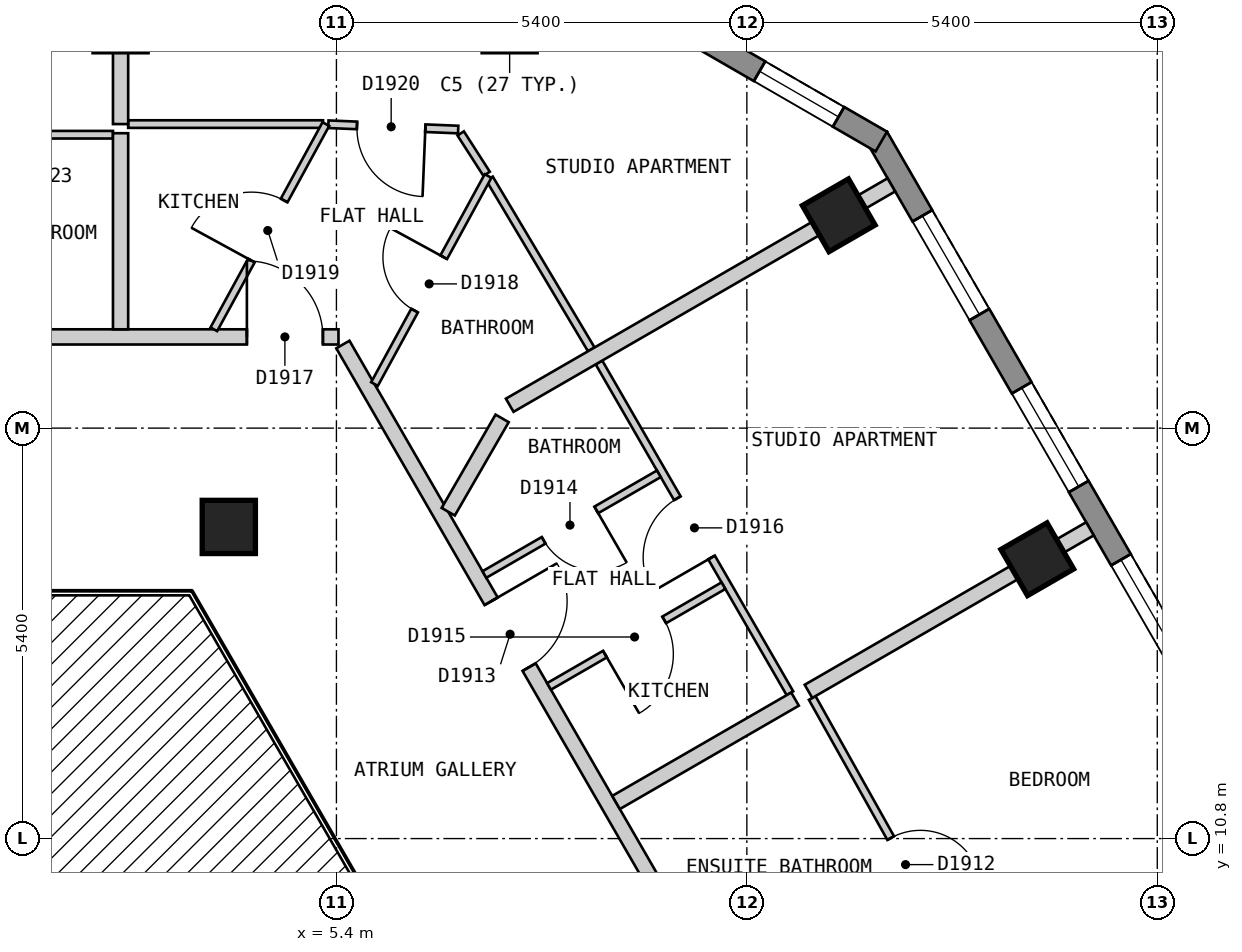
"""IFC4 building model, lengths in metres.
Left out: names, types, materials, properties, quantities, classifications, styles, units other than length and angle.
Written with IfcOpenShell. Run it as: python <this file> out.ifc"""

import sys

from ifc_helpers import new_model, si_unit, direction, frame, frame_2d, origin, origin_2d, place, context, subcontext, project, spatial, polyline, rectangle, outline, extrude, element, fill, save


model = new_model("IFC4")
c1 = context("Model", 3, precision=1e-05, world=origin(), true_north=direction((0.0, 1.0)))
c2 = subcontext(c1, "Body", "Model", "MODEL_VIEW")
j1 = project(units=[si_unit("LENGTHUNIT", "METRE"), si_unit("PLANEANGLEUNIT", "RADIAN")], contexts=[c1])
p1 = place(None, origin())
s1 = spatial("IfcSite", under=j1, at=p1, CompositionType="ELEMENT")
p2 = place(p1, origin())
s2 = spatial("IfcBuilding", under=s1, at=p2, CompositionType="ELEMENT")
p3 = place(p2, frame((0.0, 0.0, 226.8)))
s3 = spatial("IfcBuildingStorey", under=s2, at=p3, CompositionType="ELEMENT", Elevation=226.8)
for number, where, z_axis, x_axis in (
    (1, (14.621, 14.475, 0.0), (0.0, 0.0, 1.0), (-0.5, 0.866, 0.0)),
    (2, (12.009, 19.0, 0.0), (0.0, 0.0, 1.0), (-0.5, 0.866, 0.0)),
    (3, (3.984, 14.9, 0.0), (0.0, 0.0, 1.0), (1.0, 0.0, 0.0)),
):
    element("IfcColumn", number, at=place(p3, frame(where, z_axis=z_axis, x_axis=x_axis)), inside=s3, PredefinedType="COLUMN", context=c2, shape_type="SweptSolid", body=[
        extrude(rectangle(XDim=0.7, YDim=0.7, at=origin_2d()), origin(), (0.0, 0.0, 1.0), 3.0),
    ])
p4 = place(p3, frame((23.599, 0.825, 0.0), z_axis=(0.0, 0.0, 1.0), x_axis=(-0.500003656944, 0.866023292436, 0.0)))
e4 = element("IfcWall", 4, at=p4, inside=s3, PredefinedType="SOLIDWALL", context=c2, shape_type="SweptSolid", body=[
    extrude(outline(polyline([(0.0, -0.15), (22.17, -0.15), (22.09, 0.15), (0.08, 0.15), (0.0, -0.15)])), origin(), (0.0, 0.0, 1.0), 2.7),
])
p5 = place(p4, frame((1.191, 0.0, 0.15)))
e5 = element("IfcOpeningElement", 5, at=p5, cuts=e4, PredefinedType="OPENING", context=c2, shape_type="SweptSolid", body=[
    extrude(rectangle(XDim=1.5, YDim=2.1, at=frame_2d((0.75, 1.05))), frame((0.0, 0.16, 0.0), z_axis=(0.0, -1.0, 0.0), x_axis=(1.0, 0.0, 0.0)), (0.0, 0.0, 1.0), 0.32),
])
p6 = place(p4, frame((3.804, 0.0, 0.15)))
e6 = element("IfcOpeningElement", 6, at=p6, cuts=e4, PredefinedType="OPENING", context=c2, shape_type="SweptSolid", body=[
    extrude(rectangle(XDim=1.5, YDim=2.1, at=frame_2d((0.75, 1.05))), frame((0.0, 0.16, 0.0), z_axis=(0.0, -1.0, 0.0), x_axis=(1.0, 0.0, 0.0)), (0.0, 0.0, 1.0), 0.32),
])
p7 = place(p4, frame((6.417, 0.0, 0.15)))
e7 = element("IfcOpeningElement", 7, at=p7, cuts=e4, PredefinedType="OPENING", context=c2, shape_type="SweptSolid", body=[
    extrude(rectangle(XDim=1.5, YDim=2.1, at=frame_2d((0.75, 1.05))), frame((0.0, 0.16, 0.0), z_axis=(0.0, -1.0, 0.0), x_axis=(1.0, 0.0, 0.0)), (0.0, 0.0, 1.0), 0.32),
])
p8 = place(p4, frame((9.029, 0.0, 0.15)))
e8 = element("IfcOpeningElement", 8, at=p8, cuts=e4, PredefinedType="OPENING", context=c2, shape_type="SweptSolid", body=[
    extrude(rectangle(XDim=1.5, YDim=2.1, at=frame_2d((0.75, 1.05))), frame((0.0, 0.16, 0.0), z_axis=(0.0, -1.0, 0.0), x_axis=(1.0, 0.0, 0.0)), (0.0, 0.0, 1.0), 0.32),
])
p9 = place(p4, frame((11.641, 0.0, 0.15)))
e9 = element("IfcOpeningElement", 9, at=p9, cuts=e4, PredefinedType="OPENING", context=c2, shape_type="SweptSolid", body=[
    extrude(rectangle(XDim=1.5, YDim=2.1, at=frame_2d((0.75, 1.05))), frame((0.0, 0.16, 0.0), z_axis=(0.0, -1.0, 0.0), x_axis=(1.0, 0.0, 0.0)), (0.0, 0.0, 1.0), 0.32),
])
p10 = place(p4, frame((14.254, 0.0, 0.15)))
e10 = element("IfcOpeningElement", 10, at=p10, cuts=e4, PredefinedType="OPENING", context=c2, shape_type="SweptSolid", body=[
    extrude(rectangle(XDim=1.5, YDim=2.1, at=frame_2d((0.75, 1.05))), frame((0.0, 0.16, 0.0), z_axis=(0.0, -1.0, 0.0), x_axis=(1.0, 0.0, 0.0)), (0.0, 0.0, 1.0), 0.32),
])
p11 = place(p4, frame((16.866, 0.0, 0.15)))
e11 = element("IfcOpeningElement", 11, at=p11, cuts=e4, PredefinedType="OPENING", context=c2, shape_type="SweptSolid", body=[
    extrude(rectangle(XDim=1.5, YDim=2.1, at=frame_2d((0.75, 1.05))), frame((0.0, 0.16, 0.0), z_axis=(0.0, -1.0, 0.0), x_axis=(1.0, 0.0, 0.0)), (0.0, 0.0, 1.0), 0.32),
])
p12 = place(p4, frame((19.479, 0.0, 0.15)))
e12 = element("IfcOpeningElement", 12, at=p12, cuts=e4, PredefinedType="OPENING", context=c2, shape_type="SweptSolid", body=[
    extrude(rectangle(XDim=1.5, YDim=2.1, at=frame_2d((0.75, 1.05))), frame((0.0, 0.16, 0.0), z_axis=(0.0, -1.0, 0.0), x_axis=(1.0, 0.0, 0.0)), (0.0, 0.0, 1.0), 0.32),
])
p13 = place(p3, frame((12.569, 19.97, 0.0), z_axis=(0.0, 0.0, 1.0), x_axis=(-0.866022959057, 0.500004234368, 0.0)))
e13 = element("IfcWall", 13, at=p13, inside=s3, PredefinedType="SOLIDWALL", context=c2, shape_type="SweptSolid", body=[
    extrude(outline(polyline([(0.0, -0.15), (5.0, -0.15), (4.92, 0.15), (0.08, 0.15), (0.0, -0.15)])), origin(), (0.0, 0.0, 1.0), 2.7),
])
p14 = place(p13, frame((0.65, 0.0, 0.15)))
e14 = element("IfcOpeningElement", 14, at=p14, cuts=e13, PredefinedType="OPENING", context=c2, shape_type="SweptSolid", body=[
    extrude(rectangle(XDim=1.2, YDim=2.1, at=frame_2d((0.6, 1.05))), frame((0.0, 0.16, 0.0), z_axis=(0.0, -1.0, 0.0), x_axis=(1.0, 0.0, 0.0)), (0.0, 0.0, 1.0), 0.32),
])
p15 = place(p13, frame((3.15, 0.0, 0.15)))
e15 = element("IfcOpeningElement", 15, at=p15, cuts=e13, PredefinedType="OPENING", context=c2, shape_type="SweptSolid", body=[
    extrude(rectangle(XDim=1.2, YDim=2.1, at=frame_2d((0.6, 1.05))), frame((0.0, 0.16, 0.0), z_axis=(0.0, -1.0, 0.0), x_axis=(1.0, 0.0, 0.0)), (0.0, 0.0, 1.0), 0.32),
])
p16 = place(p3, frame((5.485, 17.3, 0.0), z_axis=(0.0, 0.0, 1.0), x_axis=(0.499943285704, -0.866058145322, 0.0)))
e16 = element("IfcWall", 16, at=p16, inside=s3, PredefinedType="PARTITIONING", context=c2, shape_type="SweptSolid", body=[
    extrude(rectangle(XDim=10.623, YDim=0.2, at=frame_2d((5.312, 0.0))), origin(), (0.0, 0.0, 1.0), 2.7),
])
p17 = place(p16, frame((3.901, 0.0, 0.0)))
e17 = element("IfcOpeningElement", 17, at=p17, cuts=e16, PredefinedType="OPENING", context=c2, shape_type="SweptSolid", body=[
    extrude(rectangle(XDim=1.0, YDim=2.1, at=frame_2d((0.5, 1.05))), frame((0.0, 0.11, 0.0), z_axis=(0.0, -1.0, 0.0), x_axis=(1.0, 0.0, 0.0)), (0.0, 0.0, 1.0), 0.22),
])
p18 = place(p3, frame((-5.312, 17.4, 0.0), z_axis=(0.0, 0.0, 1.0), x_axis=(1.0, 0.0, 0.0)))
e18 = element("IfcWall", 18, at=p18, inside=s3, PredefinedType="PARTITIONING", context=c2, shape_type="SweptSolid", body=[
    extrude(rectangle(XDim=10.739, YDim=0.2, at=frame_2d((5.37, 0.0))), origin(), (0.0, 0.0, 1.0), 2.7),
])
p19 = place(p18, frame((9.534, 0.0, 0.0)))
e19 = element("IfcOpeningElement", 19, at=p19, cuts=e18, PredefinedType="OPENING", context=c2, shape_type="SweptSolid", body=[
    extrude(rectangle(XDim=1.0, YDim=2.1, at=frame_2d((0.5, 1.05))), frame((0.0, 0.11, 0.0), z_axis=(0.0, -1.0, 0.0), x_axis=(1.0, 0.0, 0.0)), (0.0, 0.0, 1.0), 0.22),
])
p20 = place(p18, frame((4.812, 0.0, 0.0)))
e20 = element("IfcOpeningElement", 20, at=p20, cuts=e18, PredefinedType="OPENING", context=c2, shape_type="SweptSolid", body=[
    extrude(rectangle(XDim=1.0, YDim=2.1, at=frame_2d((0.5, 1.05))), frame((0.0, 0.11, 0.0), z_axis=(0.0, -1.0, 0.0), x_axis=(1.0, 0.0, 0.0)), (0.0, 0.0, 1.0), 0.22),
])
p21 = place(p18, frame((0.208, 0.0, 0.0)))
e21 = element("IfcOpeningElement", 21, at=p21, cuts=e18, PredefinedType="OPENING", context=c2, shape_type="SweptSolid", body=[
    extrude(rectangle(XDim=0.8, YDim=2.1, at=frame_2d((0.4, 1.05))), frame((0.0, 0.11, 0.0), z_axis=(0.0, -1.0, 0.0), x_axis=(1.0, 0.0, 0.0)), (0.0, 0.0, 1.0), 0.22),
])
p22 = place(p3, frame((7.035, 20.077, 0.0), z_axis=(0.0, 0.0, 1.0), x_axis=(0.540425167977, -0.841392083286, 0.0)))
e22 = element("IfcWall", 22, at=p22, inside=s3, PredefinedType="PARTITIONING", context=c2, shape_type="SweptSolid", body=[
    extrude(rectangle(XDim=0.631, YDim=0.1, at=frame_2d((0.315, 0.0))), origin(), (0.0, 0.0, 1.0), 2.7),
])
p23 = place(p3, frame((7.414, 19.484, 0.0), z_axis=(0.0, 0.0, 1.0), x_axis=(0.511734837015, -0.859143443544, 0.0)))
e23 = element("IfcWall", 23, at=p23, inside=s3, PredefinedType="PARTITIONING", context=c2, shape_type="SweptSolid", body=[
    extrude(rectangle(XDim=2.616, YDim=0.1, at=frame_2d((1.308, 0.0))), origin(), (0.0, 0.0, 1.0), 2.7),
])
p24 = place(p3, frame((8.854, 17.064, 0.0), z_axis=(0.0, 0.0, 1.0), x_axis=(0.500042049778, -0.866001124973, 0.0)))
e24 = element("IfcWall", 24, at=p24, inside=s3, PredefinedType="PARTITIONING", context=c2, shape_type="SweptSolid", body=[
    extrude(rectangle(XDim=5.025, YDim=0.1, at=frame_2d((2.513, 0.0))), origin(), (0.0, 0.0, 1.0), 2.7),
])
p25 = place(p24, frame((2.063, 0.0, 0.0)))
e25 = element("IfcOpeningElement", 25, at=p25, cuts=e24, PredefinedType="OPENING", context=c2, shape_type="SweptSolid", body=[
    extrude(rectangle(XDim=0.9, YDim=2.1, at=frame_2d((0.45, 1.05))), frame((0.0, 0.06, 0.0), z_axis=(0.0, -1.0, 0.0), x_axis=(1.0, 0.0, 0.0)), (0.0, 0.0, 1.0), 0.12),
])
p26 = place(p3, frame((11.66, 12.65, 0.0), z_axis=(0.0, 0.0, 1.0), x_axis=(0.488650242737, -0.872479764965, 0.0)))
e26 = element("IfcWall", 26, at=p26, inside=s3, PredefinedType="PARTITIONING", context=c2, shape_type="SweptSolid", body=[
    extrude(rectangle(XDim=5.075, YDim=0.1, at=frame_2d((2.538, 0.0))), origin(), (0.0, 0.0, 1.0), 2.7),
])
p27 = place(p26, frame((2.113, 0.0, 0.0)))
e27 = element("IfcOpeningElement", 27, at=p27, cuts=e26, PredefinedType="OPENING", context=c2, shape_type="SweptSolid", body=[
    extrude(rectangle(XDim=0.8, YDim=2.1, at=frame_2d((0.4, 1.05))), frame((0.0, 0.06, 0.0), z_axis=(0.0, -1.0, 0.0), x_axis=(1.0, 0.0, 0.0)), (0.0, 0.0, 1.0), 0.12),
])
p28 = place(p3, frame((5.294, 20.198, 0.0), z_axis=(0.0, 0.0, 1.0), x_axis=(0.999159599203, -0.040988965834, 0.0)))
e28 = element("IfcWall", 28, at=p28, inside=s3, PredefinedType="PARTITIONING", context=c2, shape_type="SweptSolid", body=[
    extrude(rectangle(XDim=1.709, YDim=0.1, at=frame_2d((0.855, 0.0))), origin(), (0.0, 0.0, 1.0), 2.7),
])
p29 = place(p28, frame((0.377, 0.0, 0.0)))
e29 = element("IfcOpeningElement", 29, at=p29, cuts=e28, PredefinedType="OPENING", context=c2, shape_type="SweptSolid", body=[
    extrude(rectangle(XDim=0.9, YDim=2.1, at=frame_2d((0.45, 1.05))), frame((0.0, 0.06, 0.0), z_axis=(0.0, -1.0, 0.0), x_axis=(1.0, 0.0, 0.0)), (0.0, 0.0, 1.0), 0.12),
])
p30 = place(p3, frame((-0.716, 20.06, 0.0), z_axis=(0.0, 0.0, 1.0), x_axis=(1.0, 0.0, 0.0)))
e30 = element("IfcWall", 30, at=p30, inside=s3, PredefinedType="PARTITIONING", context=c2, shape_type="SweptSolid", body=[
    extrude(rectangle(XDim=3.176, YDim=0.1, at=frame_2d((1.588, 0.0))), origin(), (0.0, 0.0, 1.0), 2.7),
])
p31 = place(p3, frame((2.66, 20.2, 0.0), z_axis=(0.0, 0.0, 1.0), x_axis=(1.0, 0.0, 0.0)))
e31 = element("IfcWall", 31, at=p31, inside=s3, PredefinedType="PARTITIONING", context=c2, shape_type="SweptSolid", body=[
    extrude(rectangle(XDim=2.564, YDim=0.1, at=frame_2d((1.282, 0.0))), origin(), (0.0, 0.0, 1.0), 2.7),
])
p32 = place(p3, frame((3.787, 17.5, 0.0), z_axis=(0.0, 0.0, 1.0), x_axis=(0.479146828267, 0.877734764585, 0.0)))
e32 = element("IfcWall", 32, at=p32, inside=s3, PredefinedType="PARTITIONING", context=c2, shape_type="SweptSolid", body=[
    extrude(rectangle(XDim=3.076, YDim=0.1, at=frame_2d((1.538, 0.0))), origin(), (0.0, 0.0, 1.0), 2.7),
])
p33 = place(p32, frame((1.031, 0.0, 0.0)))
e33 = element("IfcOpeningElement", 33, at=p33, cuts=e32, PredefinedType="OPENING", context=c2, shape_type="SweptSolid", body=[
    extrude(rectangle(XDim=0.9, YDim=2.1, at=frame_2d((0.45, 1.05))), frame((0.0, 0.06, 0.0), z_axis=(0.0, -1.0, 0.0), x_axis=(1.0, 0.0, 0.0)), (0.0, 0.0, 1.0), 0.12),
])
p34 = place(p3, frame((5.901, 16.78, 0.0), z_axis=(0.0, 0.0, 1.0), x_axis=(0.479148317257, 0.877733951759, 0.0)))
e34 = element("IfcWall", 34, at=p34, inside=s3, PredefinedType="PARTITIONING", context=c2, shape_type="SweptSolid", body=[
    extrude(rectangle(XDim=3.118, YDim=0.1, at=frame_2d((1.559, 0.0))), origin(), (0.0, 0.0, 1.0), 2.7),
])
p35 = place(p34, frame((1.101, 0.0, 0.0)))
e35 = element("IfcOpeningElement", 35, at=p35, cuts=e34, PredefinedType="OPENING", context=c2, shape_type="SweptSolid", body=[
    extrude(rectangle(XDim=0.8, YDim=2.1, at=frame_2d((0.4, 1.05))), frame((0.0, 0.06, 0.0), z_axis=(0.0, -1.0, 0.0), x_axis=(1.0, 0.0, 0.0)), (0.0, 0.0, 1.0), 0.12),
])
p36 = place(p3, frame((9.354, 5.401, 0.0), z_axis=(0.0, 0.0, 1.0), x_axis=(0.866018411306, 0.500012111133, 0.0)))
e36 = element("IfcWall", 36, at=p36, inside=s3, PredefinedType="PARTITIONING", context=c2, shape_type="SweptSolid", body=[
    extrude(rectangle(XDim=9.898, YDim=0.1, at=frame_2d((4.949, 0.0))), origin(), (0.0, 0.0, 1.0), 2.7),
])
p37 = place(p36, frame((7.277, 0.0, 0.0)))
e37 = element("IfcOpeningElement", 37, at=p37, cuts=e36, PredefinedType="OPENING", context=c2, shape_type="SweptSolid", body=[
    extrude(rectangle(XDim=0.9, YDim=2.1, at=frame_2d((0.45, 1.05))), frame((0.0, 0.06, 0.0), z_axis=(0.0, -1.0, 0.0), x_axis=(1.0, 0.0, 0.0)), (0.0, 0.0, 1.0), 0.12),
])
p38 = place(p3, frame((8.197, 12.802, 0.0), z_axis=(0.0, 0.0, 1.0), x_axis=(0.866029095148, 0.499993606316, 0.0)))
e38 = element("IfcWall", 38, at=p38, inside=s3, PredefinedType="PARTITIONING", context=c2, shape_type="SweptSolid", body=[
    extrude(rectangle(XDim=2.65, YDim=0.1, at=frame_2d((1.325, 0.0))), origin(), (0.0, 0.0, 1.0), 2.7),
])
p39 = place(p38, frame((0.85, 0.0, 0.0)))
e39 = element("IfcOpeningElement", 39, at=p39, cuts=e38, PredefinedType="OPENING", context=c2, shape_type="SweptSolid", body=[
    extrude(rectangle(XDim=0.9, YDim=2.1, at=frame_2d((0.45, 1.05))), frame((0.0, 0.06, 0.0), z_axis=(0.0, -1.0, 0.0), x_axis=(1.0, 0.0, 0.0)), (0.0, 0.0, 1.0), 0.12),
])
p40 = place(p3, frame((7.347, 14.274, 0.0), z_axis=(0.0, 0.0, 1.0), x_axis=(0.86601223543, 0.500022807565, 0.0)))
e40 = element("IfcWall", 40, at=p40, inside=s3, PredefinedType="PARTITIONING", context=c2, shape_type="SweptSolid", body=[
    extrude(rectangle(XDim=2.65, YDim=0.1, at=frame_2d((1.325, 0.0))), origin(), (0.0, 0.0, 1.0), 2.7),
])
p41 = place(p40, frame((0.9, 0.0, 0.0)))
e41 = element("IfcOpeningElement", 41, at=p41, cuts=e40, PredefinedType="OPENING", context=c2, shape_type="SweptSolid", body=[
    extrude(rectangle(XDim=0.8, YDim=2.1, at=frame_2d((0.4, 1.05))), frame((0.0, 0.06, 0.0), z_axis=(0.0, -1.0, 0.0), x_axis=(1.0, 0.0, 0.0)), (0.0, 0.0, 1.0), 0.12),
])
p42 = place(p3, frame((2.56, 20.08, 0.0), z_axis=(0.0, 0.0, 1.0), x_axis=(0.0, -1.0, 0.0)))
e42 = element("IfcWall", 42, at=p42, inside=s3, PredefinedType="PARTITIONING", context=c2, shape_type="SweptSolid", body=[
    extrude(rectangle(XDim=2.58, YDim=0.2, at=frame_2d((1.29, 0.0))), origin(), (0.0, 0.0, 1.0), 2.7),
])
p43 = place(p3, frame((6.871, 15.1, 0.0), z_axis=(0.0, 0.0, 1.0), x_axis=(0.50006528296, 0.865987709369, 0.0)))
e43 = element("IfcWall", 43, at=p43, inside=s3, PredefinedType="PARTITIONING", context=c2, shape_type="SweptSolid", body=[
    extrude(rectangle(XDim=1.418, YDim=0.2, at=frame_2d((0.709, 0.0))), origin(), (0.0, 0.0, 1.0), 2.7),
])
p44 = place(p3, frame((2.56, 20.2, 0.0), z_axis=(0.0, 0.0, 1.0), x_axis=(0.0, 1.0, 0.0)))
e44 = element("IfcWall", 44, at=p44, inside=s3, PredefinedType="PARTITIONING", context=c2, shape_type="SweptSolid", body=[
    extrude(rectangle(XDim=2.1, YDim=0.2, at=frame_2d((1.05, 0.0))), origin(), (0.0, 0.0, 1.0), 2.7),
])
p45 = place(p3, frame((9.079, 11.275, 0.0), z_axis=(0.0, 0.0, 1.0), x_axis=(0.865952340496, 0.500126527981, 0.0)))
e45 = element("IfcWall", 45, at=p45, inside=s3, PredefinedType="PARTITIONING", context=c2, shape_type="SweptSolid", body=[
    extrude(rectangle(XDim=2.719, YDim=0.2, at=frame_2d((1.36, 0.0))), origin(), (0.0, 0.0, 1.0), 2.7),
])
p46 = place(p3, frame((11.611, 12.737, 0.0), z_axis=(0.0, 0.0, 1.0), x_axis=(0.866017282483, 0.500014066243, 0.0)))
e46 = element("IfcWall", 46, at=p46, inside=s3, PredefinedType="PARTITIONING", context=c2, shape_type="SweptSolid", body=[
    extrude(rectangle(XDim=4.276, YDim=0.2, at=frame_2d((2.138, 0.0))), origin(), (0.0, 0.0, 1.0), 2.7),
])
p47 = place(p3, frame((7.68, 16.501, 0.0), z_axis=(0.0, 0.0, 1.0), x_axis=(0.86602149507, 0.500006770031, 0.0)))
e47 = element("IfcWall", 47, at=p47, inside=s3, PredefinedType="PARTITIONING", context=c2, shape_type="SweptSolid", body=[
    extrude(rectangle(XDim=5.798, YDim=0.2, at=frame_2d((2.899, 0.0))), origin(), (0.0, 0.0, 1.0), 2.7),
])
p48 = place(p10, origin())
e48 = element("IfcWindow", 48, at=p48, inside=s3, PartitioningType="SINGLE_PANEL", PredefinedType="WINDOW", context=c2, shape_type="SweptSolid", body=[
    extrude(rectangle(XDim=1.5, YDim=2.1, at=frame_2d((0.75, 1.05))), frame((0.0, 0.03, 0.0), z_axis=(0.0, -1.0, 0.0), x_axis=(1.0, 0.0, 0.0)), (0.0, 0.0, 1.0), 0.06),
])
fill(e10, e48)
p49 = place(p11, origin())
e49 = element("IfcWindow", 49, at=p49, inside=s3, PartitioningType="SINGLE_PANEL", PredefinedType="WINDOW", context=c2, shape_type="SweptSolid", body=[
    extrude(rectangle(XDim=1.5, YDim=2.1, at=frame_2d((0.75, 1.05))), frame((0.0, 0.03, 0.0), z_axis=(0.0, -1.0, 0.0), x_axis=(1.0, 0.0, 0.0)), (0.0, 0.0, 1.0), 0.06),
])
fill(e11, e49)
p50 = place(p12, origin())
e50 = element("IfcWindow", 50, at=p50, inside=s3, PartitioningType="SINGLE_PANEL", PredefinedType="WINDOW", context=c2, shape_type="SweptSolid", body=[
    extrude(rectangle(XDim=1.5, YDim=2.1, at=frame_2d((0.75, 1.05))), frame((0.0, 0.03, 0.0), z_axis=(0.0, -1.0, 0.0), x_axis=(1.0, 0.0, 0.0)), (0.0, 0.0, 1.0), 0.06),
])
fill(e12, e50)
p51 = place(p14, origin())
e51 = element("IfcWindow", 51, at=p51, inside=s3, PartitioningType="SINGLE_PANEL", PredefinedType="WINDOW", context=c2, shape_type="SweptSolid", body=[
    extrude(rectangle(XDim=1.2, YDim=2.1, at=frame_2d((0.6, 1.05))), frame((0.0, 0.03, 0.0), z_axis=(0.0, -1.0, 0.0), x_axis=(1.0, 0.0, 0.0)), (0.0, 0.0, 1.0), 0.06),
])
fill(e14, e51)
p52 = place(p27, origin())
e52 = element("IfcDoor", 52, at=p52, inside=s3, OperationType="SINGLE_SWING_RIGHT", PredefinedType="DOOR", context=c2, shape_type="SweptSolid", body=[
    extrude(rectangle(XDim=0.8, YDim=2.1, at=frame_2d((0.4, 1.05))), frame((0.0, 0.025, 0.0), z_axis=(0.0, -1.0, 0.0), x_axis=(1.0, 0.0, 0.0)), (0.0, 0.0, 1.0), 0.05),
])
fill(e27, e52)
p53 = place(p17, origin())
e53 = element("IfcDoor", 53, at=p53, inside=s3, OperationType="SINGLE_SWING_LEFT", PredefinedType="DOOR", context=c2, shape_type="SweptSolid", body=[
    extrude(rectangle(XDim=1.0, YDim=2.1, at=frame_2d((0.5, 1.05))), frame((0.0, 0.025, 0.0), z_axis=(0.0, -1.0, 0.0), x_axis=(1.0, 0.0, 0.0)), (0.0, 0.0, 1.0), 0.05),
])
fill(e17, e53)
p54 = place(p41, origin())
e54 = element("IfcDoor", 54, at=p54, inside=s3, OperationType="SINGLE_SWING_RIGHT", PredefinedType="DOOR", context=c2, shape_type="SweptSolid", body=[
    extrude(rectangle(XDim=0.8, YDim=2.1, at=frame_2d((0.4, 1.05))), frame((0.0, 0.025, 0.0), z_axis=(0.0, -1.0, 0.0), x_axis=(1.0, 0.0, 0.0)), (0.0, 0.0, 1.0), 0.05),
])
fill(e41, e54)
p55 = place(p39, origin())
e55 = element("IfcDoor", 55, at=p55, inside=s3, OperationType="SINGLE_SWING_LEFT", PredefinedType="DOOR", context=c2, shape_type="SweptSolid", body=[
    extrude(rectangle(XDim=0.9, YDim=2.1, at=frame_2d((0.45, 1.05))), frame((0.0, 0.025, 0.0), z_axis=(0.0, -1.0, 0.0), x_axis=(1.0, 0.0, 0.0)), (0.0, 0.0, 1.0), 0.05),
])
fill(e39, e55)
p56 = place(p25, origin())
e56 = element("IfcDoor", 56, at=p56, inside=s3, OperationType="SINGLE_SWING_RIGHT", PredefinedType="DOOR", context=c2, shape_type="SweptSolid", body=[
    extrude(rectangle(XDim=0.9, YDim=2.1, at=frame_2d((0.45, 1.05))), frame((0.0, 0.025, 0.0), z_axis=(0.0, -1.0, 0.0), x_axis=(1.0, 0.0, 0.0)), (0.0, 0.0, 1.0), 0.05),
])
fill(e25, e56)
p57 = place(p19, origin())
e57 = element("IfcDoor", 57, at=p57, inside=s3, OperationType="SINGLE_SWING_LEFT", PredefinedType="DOOR", context=c2, shape_type="SweptSolid", body=[
    extrude(rectangle(XDim=1.0, YDim=2.1, at=frame_2d((0.5, 1.05))), frame((0.0, 0.025, 0.0), z_axis=(0.0, -1.0, 0.0), x_axis=(1.0, 0.0, 0.0)), (0.0, 0.0, 1.0), 0.05),
])
fill(e19, e57)
p58 = place(p35, origin())
e58 = element("IfcDoor", 58, at=p58, inside=s3, OperationType="SINGLE_SWING_RIGHT", PredefinedType="DOOR", context=c2, shape_type="SweptSolid", body=[
    extrude(rectangle(XDim=0.8, YDim=2.1, at=frame_2d((0.4, 1.05))), frame((0.0, 0.025, 0.0), z_axis=(0.0, -1.0, 0.0), x_axis=(1.0, 0.0, 0.0)), (0.0, 0.0, 1.0), 0.05),
])
fill(e35, e58)
p59 = place(p33, origin())
e59 = element("IfcDoor", 59, at=p59, inside=s3, OperationType="SINGLE_SWING_LEFT", PredefinedType="DOOR", context=c2, shape_type="SweptSolid", body=[
    extrude(rectangle(XDim=0.9, YDim=2.1, at=frame_2d((0.45, 1.05))), frame((0.0, 0.025, 0.0), z_axis=(0.0, -1.0, 0.0), x_axis=(1.0, 0.0, 0.0)), (0.0, 0.0, 1.0), 0.05),
])
fill(e33, e59)
p60 = place(p29, origin())
e60 = element("IfcDoor", 60, at=p60, inside=s3, OperationType="SINGLE_SWING_RIGHT", PredefinedType="DOOR", context=c2, shape_type="SweptSolid", body=[
    extrude(rectangle(XDim=0.9, YDim=2.1, at=frame_2d((0.45, 1.05))), frame((0.0, 0.025, 0.0), z_axis=(0.0, -1.0, 0.0), x_axis=(1.0, 0.0, 0.0)), (0.0, 0.0, 1.0), 0.05),
])
fill(e29, e60)
save(model, sys.argv[1])
